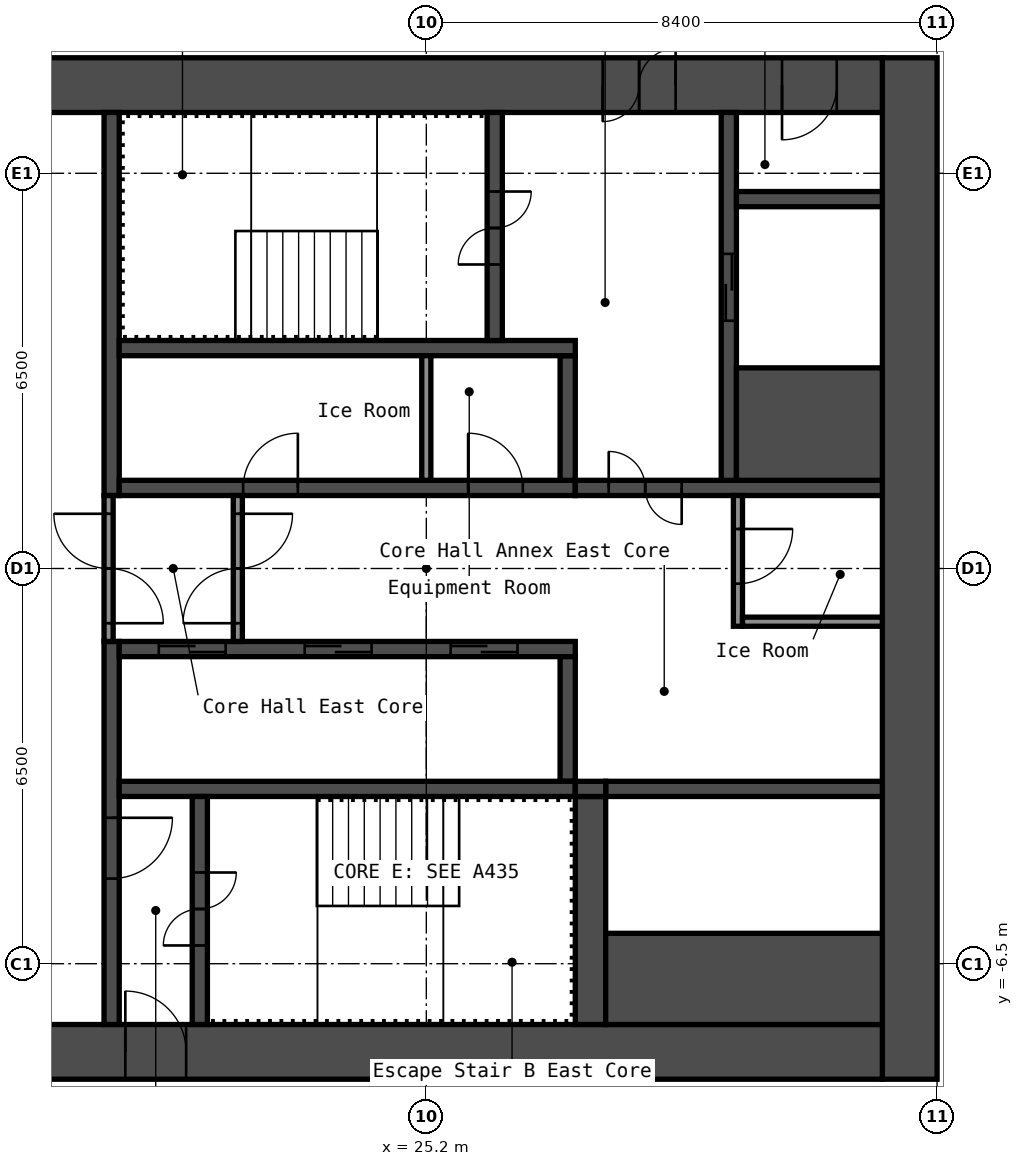
"""IFC4 building model, lengths in metres.
Left out: names, types, materials, properties, quantities, classifications, styles, units other than length and angle.
Written with IfcOpenShell. Run it as: python <this file> out.ifc"""

import sys

from ifc_helpers import new_model, si_unit, direction, frame, frame_2d, origin, place, context, subcontext, project, spatial, rectangle, extrude, element, fill, save


model = new_model("IFC4")
c1 = context("Model", 3, precision=1e-05, world=origin(), true_north=direction((0.0, 1.0)))
c2 = subcontext(c1, "Body", "Model", "MODEL_VIEW")
j1 = project(units=[si_unit("LENGTHUNIT", "METRE"), si_unit("PLANEANGLEUNIT", "RADIAN")], contexts=[c1])
p1 = place(None, origin())
s1 = spatial("IfcSite", under=j1, at=p1, CompositionType="ELEMENT")
p2 = place(p1, origin())
s2 = spatial("IfcBuilding", under=s1, at=p2, CompositionType="ELEMENT")
p3 = place(p2, frame((0.0, 0.0, 242.2)))
s3 = spatial("IfcBuildingStorey", under=s2, at=p3, CompositionType="ELEMENT", Elevation=242.2)
p4 = place(p3, frame((33.15, -8.4, 0.0), z_axis=(0.0, 0.0, 1.0), x_axis=(0.0, 1.0, 0.0)))
e1 = element("IfcWall", 1, at=p4, inside=s3, PredefinedType="SHEAR", context=c2, shape_type="SweptSolid", body=[
    extrude(rectangle(XDim=16.8, YDim=0.9, at=frame_2d((8.4, 0.0))), origin(), (0.0, 0.0, 1.0), 2.75),
])
p5 = place(p3, frame((17.7, 7.95, 0.0), z_axis=(0.0, 0.0, 1.0), x_axis=(1.0, 0.0, 0.0)))
e2 = element("IfcWall", 2, at=p5, inside=s3, PredefinedType="SHEAR", context=c2, shape_type="SweptSolid", body=[
    extrude(rectangle(XDim=15.0, YDim=0.9, at=frame_2d((7.5, 0.0))), origin(), (0.0, 0.0, 1.0), 2.75),
])
p6 = place(p5, frame((10.4, 0.0, 0.0)))
e3 = element("IfcOpeningElement", 3, at=p6, cuts=e2, PredefinedType="OPENING", context=c2, shape_type="SweptSolid", body=[
    extrude(rectangle(XDim=1.2, YDim=2.1, at=frame_2d((0.6, 1.05))), frame((0.0, 0.46, 0.0), z_axis=(0.0, -1.0, 0.0), x_axis=(1.0, 0.0, 0.0)), (0.0, 0.0, 1.0), 0.92),
])
p7 = place(p5, frame((13.35, 0.0, 0.0)))
e4 = element("IfcOpeningElement", 4, at=p7, cuts=e2, PredefinedType="OPENING", context=c2, shape_type="SweptSolid", body=[
    extrude(rectangle(XDim=0.9, YDim=2.1, at=frame_2d((0.45, 1.05))), frame((0.0, 0.46, 0.0), z_axis=(0.0, -1.0, 0.0), x_axis=(1.0, 0.0, 0.0)), (0.0, 0.0, 1.0), 0.92),
])
p8 = place(p3, frame((17.7, -7.95, 0.0), z_axis=(0.0, 0.0, 1.0), x_axis=(1.0, 0.0, 0.0)))
e5 = element("IfcWall", 5, at=p8, inside=s3, PredefinedType="SHEAR", context=c2, shape_type="SweptSolid", body=[
    extrude(rectangle(XDim=15.0, YDim=0.9, at=frame_2d((7.5, 0.0))), origin(), (0.0, 0.0, 1.0), 2.75),
])
p9 = place(p8, frame((2.55, 0.0, 0.0)))
e6 = element("IfcOpeningElement", 6, at=p9, cuts=e5, PredefinedType="OPENING", context=c2, shape_type="SweptSolid", body=[
    extrude(rectangle(XDim=1.0, YDim=2.1, at=frame_2d((0.5, 1.05))), frame((0.0, 0.46, 0.0), z_axis=(0.0, -1.0, 0.0), x_axis=(1.0, 0.0, 0.0)), (0.0, 0.0, 1.0), 0.92),
])
p10 = place(p3, frame((20.025, 1.2, 0.0), z_axis=(0.0, 0.0, 1.0), x_axis=(0.0, 1.0, 0.0)))
e7 = element("IfcWall", 7, at=p10, inside=s3, PredefinedType="SHEAR", context=c2, shape_type="SweptSolid", body=[
    extrude(rectangle(XDim=6.3, YDim=0.25, at=frame_2d((3.15, 0.0))), origin(), (0.0, 0.0, 1.0), 2.75),
])
p11 = place(p3, frame((20.025, -7.5, 0.0), z_axis=(0.0, 0.0, 1.0), x_axis=(0.0, 1.0, 0.0)))
e8 = element("IfcWall", 8, at=p11, inside=s3, PredefinedType="SHEAR", context=c2, shape_type="SweptSolid", body=[
    extrude(rectangle(XDim=6.3, YDim=0.25, at=frame_2d((3.15, 0.0))), origin(), (0.0, 0.0, 1.0), 2.75),
])
p12 = place(p11, frame((2.4, 0.0, 0.0)))
e9 = element("IfcOpeningElement", 9, at=p12, cuts=e8, PredefinedType="OPENING", context=c2, shape_type="SweptSolid", body=[
    extrude(rectangle(XDim=1.0, YDim=2.1, at=frame_2d((0.5, 1.05))), frame((0.0, 0.135, 0.0), z_axis=(0.0, -1.0, 0.0), x_axis=(1.0, 0.0, 0.0)), (0.0, 0.0, 1.0), 0.27),
])
p13 = place(p3, frame((20.15, 1.325, 0.0), z_axis=(0.0, 0.0, 1.0), x_axis=(1.0, 0.0, 0.0)))
e10 = element("IfcWall", 10, at=p13, inside=s3, PredefinedType="SHEAR", context=c2, shape_type="SweptSolid", body=[
    extrude(rectangle(XDim=7.5, YDim=0.25, at=frame_2d((3.75, 0.0))), origin(), (0.0, 0.0, 1.0), 2.75),
])
p14 = place(p13, frame((2.038, 0.0, 0.0)))
e11 = element("IfcOpeningElement", 11, at=p14, cuts=e10, PredefinedType="OPENING", context=c2, shape_type="SweptSolid", body=[
    extrude(rectangle(XDim=0.9, YDim=2.1, at=frame_2d((0.45, 1.05))), frame((0.0, 0.135, 0.0), z_axis=(0.0, -1.0, 0.0), x_axis=(1.0, 0.0, 0.0)), (0.0, 0.0, 1.0), 0.27),
])
p15 = place(p13, frame((5.738, 0.0, 0.0)))
e12 = element("IfcOpeningElement", 12, at=p15, cuts=e10, PredefinedType="OPENING", context=c2, shape_type="SweptSolid", body=[
    extrude(rectangle(XDim=0.9, YDim=2.1, at=frame_2d((0.45, 1.05))), frame((0.0, 0.135, 0.0), z_axis=(0.0, -1.0, 0.0), x_axis=(1.0, 0.0, 0.0)), (0.0, 0.0, 1.0), 0.27),
])
p16 = place(p3, frame((27.525, 1.45, 0.0), z_axis=(0.0, 0.0, 1.0), x_axis=(0.0, 1.0, 0.0)))
e13 = element("IfcWall", 13, at=p16, inside=s3, PredefinedType="SHEAR", context=c2, shape_type="SweptSolid", body=[
    extrude(rectangle(XDim=2.05, YDim=0.25, at=frame_2d((1.025, 0.0))), origin(), (0.0, 0.0, 1.0), 2.75),
])
p17 = place(p3, frame((20.15, 3.625, 0.0), z_axis=(0.0, 0.0, 1.0), x_axis=(1.0, 0.0, 0.0)))
e14 = element("IfcWall", 14, at=p17, inside=s3, PredefinedType="SHEAR", context=c2, shape_type="SweptSolid", body=[
    extrude(rectangle(XDim=7.5, YDim=0.25, at=frame_2d((3.75, 0.0))), origin(), (0.0, 0.0, 1.0), 2.75),
])
p18 = place(p3, frame((26.325, 3.75, 0.0), z_axis=(0.0, 0.0, 1.0), x_axis=(0.0, 1.0, 0.0)))
e15 = element("IfcWall", 15, at=p18, inside=s3, PredefinedType="SHEAR", context=c2, shape_type="SweptSolid", body=[
    extrude(rectangle(XDim=3.75, YDim=0.25, at=frame_2d((1.875, 0.0))), origin(), (0.0, 0.0, 1.0), 2.75),
])
p19 = place(p18, frame((1.25, 0.0, 0.0)))
e16 = element("IfcOpeningElement", 16, at=p19, cuts=e15, PredefinedType="OPENING", context=c2, shape_type="SweptSolid", body=[
    extrude(rectangle(XDim=1.2, YDim=2.1, at=frame_2d((0.6, 1.05))), frame((0.0, 0.135, 0.0), z_axis=(0.0, -1.0, 0.0), x_axis=(1.0, 0.0, 0.0)), (0.0, 0.0, 1.0), 0.27),
])
p20 = place(p3, frame((27.65, 1.325, 0.0), z_axis=(0.0, 0.0, 1.0), x_axis=(1.0, 0.0, 0.0)))
e17 = element("IfcWall", 17, at=p20, inside=s3, PredefinedType="SHEAR", context=c2, shape_type="SweptSolid", body=[
    extrude(rectangle(XDim=5.05, YDim=0.25, at=frame_2d((2.525, 0.0))), origin(), (0.0, 0.0, 1.0), 2.75),
])
p21 = place(p20, frame((0.55, 0.0, 0.0)))
e18 = element("IfcOpeningElement", 18, at=p21, cuts=e17, PredefinedType="OPENING", context=c2, shape_type="SweptSolid", body=[
    extrude(rectangle(XDim=1.2, YDim=2.1, at=frame_2d((0.6, 1.05))), frame((0.0, 0.135, 0.0), z_axis=(0.0, -1.0, 0.0), x_axis=(1.0, 0.0, 0.0)), (0.0, 0.0, 1.0), 0.27),
])
p22 = place(p3, frame((30.175, 1.45, 0.0), z_axis=(0.0, 0.0, 1.0), x_axis=(0.0, 1.0, 0.0)))
e19 = element("IfcWall", 19, at=p22, inside=s3, PredefinedType="SHEAR", context=c2, shape_type="SweptSolid", body=[
    extrude(rectangle(XDim=6.05, YDim=0.25, at=frame_2d((3.025, 0.0))), origin(), (0.0, 0.0, 1.0), 2.75),
])
p23 = place(p22, frame((2.625, 0.0, 0.0)))
e20 = element("IfcOpeningElement", 20, at=p23, cuts=e19, PredefinedType="OPENING", context=c2, shape_type="SweptSolid", body=[
    extrude(rectangle(XDim=1.1, YDim=2.1, at=frame_2d((0.55, 1.05))), frame((0.0, 0.135, 0.0), z_axis=(0.0, -1.0, 0.0), x_axis=(1.0, 0.0, 0.0)), (0.0, 0.0, 1.0), 0.27),
])
p24 = place(p3, frame((30.3, 2.375, 0.0), z_axis=(0.0, 0.0, 1.0), x_axis=(1.0, 0.0, 0.0)))
e21 = element("IfcWall", 21, at=p24, inside=s3, PredefinedType="SHEAR", context=c2, shape_type="SweptSolid", body=[
    extrude(rectangle(XDim=2.4, YDim=1.85, at=frame_2d((1.2, 0.0))), origin(), (0.0, 0.0, 1.0), 2.75),
])
p25 = place(p3, frame((30.3, 6.075, 0.0), z_axis=(0.0, 0.0, 1.0), x_axis=(1.0, 0.0, 0.0)))
e22 = element("IfcWall", 22, at=p25, inside=s3, PredefinedType="SHEAR", context=c2, shape_type="SweptSolid", body=[
    extrude(rectangle(XDim=2.4, YDim=0.25, at=frame_2d((1.2, 0.0))), origin(), (0.0, 0.0, 1.0), 2.75),
])
p26 = place(p3, frame((20.15, -1.325, 0.0), z_axis=(0.0, 0.0, 1.0), x_axis=(1.0, 0.0, 0.0)))
e23 = element("IfcWall", 23, at=p26, inside=s3, PredefinedType="SHEAR", context=c2, shape_type="SweptSolid", body=[
    extrude(rectangle(XDim=7.5, YDim=0.25, at=frame_2d((3.75, 0.0))), origin(), (0.0, 0.0, 1.0), 2.75),
])
p27 = place(p26, frame((0.65, 0.0, 0.0)))
e24 = element("IfcOpeningElement", 24, at=p27, cuts=e23, PredefinedType="OPENING", context=c2, shape_type="SweptSolid", body=[
    extrude(rectangle(XDim=1.1, YDim=2.1, at=frame_2d((0.55, 1.05))), frame((0.0, 0.135, 0.0), z_axis=(0.0, -1.0, 0.0), x_axis=(1.0, 0.0, 0.0)), (0.0, 0.0, 1.0), 0.27),
])
p28 = place(p26, frame((3.05, 0.0, 0.0)))
e25 = element("IfcOpeningElement", 25, at=p28, cuts=e23, PredefinedType="OPENING", context=c2, shape_type="SweptSolid", body=[
    extrude(rectangle(XDim=1.1, YDim=2.1, at=frame_2d((0.55, 1.05))), frame((0.0, 0.135, 0.0), z_axis=(0.0, -1.0, 0.0), x_axis=(1.0, 0.0, 0.0)), (0.0, 0.0, 1.0), 0.27),
])
p29 = place(p26, frame((5.45, 0.0, 0.0)))
e26 = element("IfcOpeningElement", 26, at=p29, cuts=e23, PredefinedType="OPENING", context=c2, shape_type="SweptSolid", body=[
    extrude(rectangle(XDim=1.1, YDim=2.1, at=frame_2d((0.55, 1.05))), frame((0.0, 0.135, 0.0), z_axis=(0.0, -1.0, 0.0), x_axis=(1.0, 0.0, 0.0)), (0.0, 0.0, 1.0), 0.27),
])
p30 = place(p3, frame((27.525, -3.5, 0.0), z_axis=(0.0, 0.0, 1.0), x_axis=(0.0, 1.0, 0.0)))
e27 = element("IfcWall", 27, at=p30, inside=s3, PredefinedType="SHEAR", context=c2, shape_type="SweptSolid", body=[
    extrude(rectangle(XDim=2.05, YDim=0.25, at=frame_2d((1.025, 0.0))), origin(), (0.0, 0.0, 1.0), 2.75),
])
p31 = place(p3, frame((20.15, -3.625, 0.0), z_axis=(0.0, 0.0, 1.0), x_axis=(1.0, 0.0, 0.0)))
e28 = element("IfcWall", 28, at=p31, inside=s3, PredefinedType="SHEAR", context=c2, shape_type="SweptSolid", body=[
    extrude(rectangle(XDim=7.5, YDim=0.25, at=frame_2d((3.75, 0.0))), origin(), (0.0, 0.0, 1.0), 2.75),
])
p32 = place(p3, frame((21.475, -7.5, 0.0), z_axis=(0.0, 0.0, 1.0), x_axis=(0.0, 1.0, 0.0)))
e29 = element("IfcWall", 29, at=p32, inside=s3, PredefinedType="SHEAR", context=c2, shape_type="SweptSolid", body=[
    extrude(rectangle(XDim=3.75, YDim=0.25, at=frame_2d((1.875, 0.0))), origin(), (0.0, 0.0, 1.0), 2.75),
])
p33 = place(p32, frame((1.3, 0.0, 0.0)))
e30 = element("IfcOpeningElement", 30, at=p33, cuts=e29, PredefinedType="OPENING", context=c2, shape_type="SweptSolid", body=[
    extrude(rectangle(XDim=1.2, YDim=2.1, at=frame_2d((0.6, 1.05))), frame((0.0, 0.135, 0.0), z_axis=(0.0, -1.0, 0.0), x_axis=(1.0, 0.0, 0.0)), (0.0, 0.0, 1.0), 0.27),
])
p34 = place(p3, frame((27.9, -7.5, 0.0), z_axis=(0.0, 0.0, 1.0), x_axis=(0.0, 1.0, 0.0)))
e31 = element("IfcWall", 31, at=p34, inside=s3, PredefinedType="SHEAR", context=c2, shape_type="SweptSolid", body=[
    extrude(rectangle(XDim=3.75, YDim=0.5, at=frame_2d((1.875, 0.0))), origin(), (0.0, 0.0, 1.0), 2.75),
])
p35 = place(p3, frame((28.15, -3.625, 0.0), z_axis=(0.0, 0.0, 1.0), x_axis=(1.0, 0.0, 0.0)))
e32 = element("IfcWall", 32, at=p35, inside=s3, PredefinedType="SHEAR", context=c2, shape_type="SweptSolid", body=[
    extrude(rectangle(XDim=4.55, YDim=0.25, at=frame_2d((2.275, 0.0))), origin(), (0.0, 0.0, 1.0), 2.75),
])
p36 = place(p3, frame((28.15, -6.75, 0.0), z_axis=(0.0, 0.0, 1.0), x_axis=(1.0, 0.0, 0.0)))
e33 = element("IfcWall", 33, at=p36, inside=s3, PredefinedType="SHEAR", context=c2, shape_type="SweptSolid", body=[
    extrude(rectangle(XDim=4.55, YDim=1.5, at=frame_2d((2.275, 0.0))), origin(), (0.0, 0.0, 1.0), 2.75),
])
p37 = place(p3, frame((27.65, -3.625, 0.0), z_axis=(0.0, 0.0, 1.0), x_axis=(1.0, 0.0, 0.0)))
e34 = element("IfcWall", 34, at=p37, inside=s3, PredefinedType="SHEAR", context=c2, shape_type="SweptSolid", body=[
    extrude(rectangle(XDim=0.5, YDim=0.25, at=frame_2d((0.25, 0.0))), origin(), (0.0, 0.0, 1.0), 2.75),
])
p38 = place(p3, frame((19.975, -1.2, 0.0), z_axis=(0.0, 0.0, 1.0), x_axis=(0.0, 1.0, 0.0)))
e35 = element("IfcWall", 35, at=p38, inside=s3, PredefinedType="PARTITIONING", context=c2, shape_type="SweptSolid", body=[
    extrude(rectangle(XDim=2.4, YDim=0.15, at=frame_2d((1.2, 0.0))), origin(), (0.0, 0.0, 1.0), 2.75),
])
p39 = place(p38, frame((0.3, 0.0, 0.0)))
e36 = element("IfcOpeningElement", 36, at=p39, cuts=e35, PredefinedType="OPENING", context=c2, shape_type="SweptSolid", body=[
    extrude(rectangle(XDim=1.8, YDim=2.1, at=frame_2d((0.9, 1.05))), frame((0.0, 0.085, 0.0), z_axis=(0.0, -1.0, 0.0), x_axis=(1.0, 0.0, 0.0)), (0.0, 0.0, 1.0), 0.17),
])
p40 = place(p3, frame((22.1, -1.2, 0.0), z_axis=(0.0, 0.0, 1.0), x_axis=(0.0, 1.0, 0.0)))
e37 = element("IfcWall", 37, at=p40, inside=s3, PredefinedType="PARTITIONING", context=c2, shape_type="SweptSolid", body=[
    extrude(rectangle(XDim=2.4, YDim=0.15, at=frame_2d((1.2, 0.0))), origin(), (0.0, 0.0, 1.0), 2.75),
])
p41 = place(p40, frame((0.3, 0.0, 0.0)))
e38 = element("IfcOpeningElement", 38, at=p41, cuts=e37, PredefinedType="OPENING", context=c2, shape_type="SweptSolid", body=[
    extrude(rectangle(XDim=1.8, YDim=2.1, at=frame_2d((0.9, 1.05))), frame((0.0, 0.085, 0.0), z_axis=(0.0, -1.0, 0.0), x_axis=(1.0, 0.0, 0.0)), (0.0, 0.0, 1.0), 0.17),
])
p42 = place(p3, frame((30.325, -0.95, 0.0), z_axis=(0.0, 0.0, 1.0), x_axis=(0.0, 1.0, 0.0)))
e39 = element("IfcWall", 39, at=p42, inside=s3, PredefinedType="PARTITIONING", context=c2, shape_type="SweptSolid", body=[
    extrude(rectangle(XDim=2.15, YDim=0.15, at=frame_2d((1.075, 0.0))), origin(), (0.0, 0.0, 1.0), 2.75),
])
p43 = place(p42, frame((0.7, 0.0, 0.0)))
e40 = element("IfcOpeningElement", 40, at=p43, cuts=e39, PredefinedType="OPENING", context=c2, shape_type="SweptSolid", body=[
    extrude(rectangle(XDim=0.9, YDim=2.1, at=frame_2d((0.45, 1.05))), frame((0.0, 0.085, 0.0), z_axis=(0.0, -1.0, 0.0), x_axis=(1.0, 0.0, 0.0)), (0.0, 0.0, 1.0), 0.17),
])
p44 = place(p3, frame((30.4, -0.875, 0.0), z_axis=(0.0, 0.0, 1.0), x_axis=(1.0, 0.0, 0.0)))
e41 = element("IfcWall", 41, at=p44, inside=s3, PredefinedType="PARTITIONING", context=c2, shape_type="SweptSolid", body=[
    extrude(rectangle(XDim=2.3, YDim=0.15, at=frame_2d((1.15, 0.0))), origin(), (0.0, 0.0, 1.0), 2.75),
])
p45 = place(p3, frame((25.2, 1.45, 0.0), z_axis=(0.0, 0.0, 1.0), x_axis=(0.0, 1.0, 0.0)))
e42 = element("IfcWall", 42, at=p45, inside=s3, PredefinedType="PARTITIONING", context=c2, shape_type="SweptSolid", body=[
    extrude(rectangle(XDim=2.05, YDim=0.15, at=frame_2d((1.025, 0.0))), origin(), (0.0, 0.0, 1.0), 2.75),
])
p46 = place(p6, origin())
e43 = element("IfcDoor", 43, at=p46, inside=s3, OperationType="DOUBLE_DOOR_SINGLE_SWING", PredefinedType="DOOR", context=c2, shape_type="SweptSolid", body=[
    extrude(rectangle(XDim=1.2, YDim=2.1, at=frame_2d((0.6, 1.05))), frame((0.0, 0.025, 0.0), z_axis=(0.0, -1.0, 0.0), x_axis=(1.0, 0.0, 0.0)), (0.0, 0.0, 1.0), 0.05),
])
fill(e3, e43)
p47 = place(p7, origin())
e44 = element("IfcDoor", 44, at=p47, inside=s3, OperationType="SINGLE_SWING_LEFT", PredefinedType="DOOR", context=c2, shape_type="SweptSolid", body=[
    extrude(rectangle(XDim=0.9, YDim=2.1, at=frame_2d((0.45, 1.05))), frame((0.0, 0.025, 0.0), z_axis=(0.0, -1.0, 0.0), x_axis=(1.0, 0.0, 0.0)), (0.0, 0.0, 1.0), 0.05),
])
fill(e4, e44)
p48 = place(p9, origin())
e45 = element("IfcDoor", 45, at=p48, inside=s3, OperationType="SINGLE_SWING_RIGHT", PredefinedType="DOOR", context=c2, shape_type="SweptSolid", body=[
    extrude(rectangle(XDim=1.0, YDim=2.1, at=frame_2d((0.5, 1.05))), frame((0.0, 0.025, 0.0), z_axis=(0.0, -1.0, 0.0), x_axis=(1.0, 0.0, 0.0)), (0.0, 0.0, 1.0), 0.05),
])
fill(e6, e45)
p49 = place(p19, origin())
e46 = element("IfcDoor", 46, at=p49, inside=s3, OperationType="DOUBLE_DOOR_SINGLE_SWING", PredefinedType="DOOR", context=c2, shape_type="SweptSolid", body=[
    extrude(rectangle(XDim=1.2, YDim=2.1, at=frame_2d((0.6, 1.05))), frame((0.0, 0.025, 0.0), z_axis=(0.0, -1.0, 0.0), x_axis=(1.0, 0.0, 0.0)), (0.0, 0.0, 1.0), 0.05),
])
fill(e16, e46)
p50 = place(p33, origin())
e47 = element("IfcDoor", 47, at=p50, inside=s3, OperationType="DOUBLE_DOOR_SINGLE_SWING", PredefinedType="DOOR", context=c2, shape_type="SweptSolid", body=[
    extrude(rectangle(XDim=1.2, YDim=2.1, at=frame_2d((0.6, 1.05))), frame((0.0, 0.025, 0.0), z_axis=(0.0, -1.0, 0.0), x_axis=(1.0, 0.0, 0.0)), (0.0, 0.0, 1.0), 0.05),
])
fill(e30, e47)
p51 = place(p12, origin())
e48 = element("IfcDoor", 48, at=p51, inside=s3, OperationType="SINGLE_SWING_RIGHT", PredefinedType="DOOR", context=c2, shape_type="SweptSolid", body=[
    extrude(rectangle(XDim=1.0, YDim=2.1, at=frame_2d((0.5, 1.05))), frame((0.0, 0.025, 0.0), z_axis=(0.0, -1.0, 0.0), x_axis=(1.0, 0.0, 0.0)), (0.0, 0.0, 1.0), 0.05),
])
fill(e9, e48)
p52 = place(p21, origin())
e49 = element("IfcDoor", 49, at=p52, inside=s3, OperationType="DOUBLE_DOOR_SINGLE_SWING", PredefinedType="DOOR", context=c2, shape_type="SweptSolid", body=[
    extrude(rectangle(XDim=1.2, YDim=2.1, at=frame_2d((0.6, 1.05))), frame((0.0, 0.025, 0.0), z_axis=(0.0, -1.0, 0.0), x_axis=(1.0, 0.0, 0.0)), (0.0, 0.0, 1.0), 0.05),
])
fill(e18, e49)
p53 = place(p39, origin())
e50 = element("IfcDoor", 50, at=p53, inside=s3, OperationType="DOUBLE_DOOR_SINGLE_SWING", PredefinedType="DOOR", context=c2, shape_type="SweptSolid", body=[
    extrude(rectangle(XDim=1.8, YDim=2.1, at=frame_2d((0.9, 1.05))), frame((0.0, 0.025, 0.0), z_axis=(0.0, -1.0, 0.0), x_axis=(1.0, 0.0, 0.0)), (0.0, 0.0, 1.0), 0.05),
])
fill(e36, e50)
p54 = place(p41, origin())
e51 = element("IfcDoor", 51, at=p54, inside=s3, OperationType="DOUBLE_DOOR_SINGLE_SWING", PredefinedType="DOOR", context=c2, shape_type="SweptSolid", body=[
    extrude(rectangle(XDim=1.8, YDim=2.1, at=frame_2d((0.9, 1.05))), frame((0.0, 0.025, 0.0), z_axis=(0.0, -1.0, 0.0), x_axis=(1.0, 0.0, 0.0)), (0.0, 0.0, 1.0), 0.05),
])
fill(e38, e51)
p55 = place(p43, origin())
e52 = element("IfcDoor", 52, at=p55, inside=s3, OperationType="SINGLE_SWING_RIGHT", PredefinedType="DOOR", context=c2, shape_type="SweptSolid", body=[
    extrude(rectangle(XDim=0.9, YDim=2.1, at=frame_2d((0.45, 1.05))), frame((0.0, 0.025, 0.0), z_axis=(0.0, -1.0, 0.0), x_axis=(1.0, 0.0, 0.0)), (0.0, 0.0, 1.0), 0.05),
])
fill(e40, e52)
p56 = place(p14, origin())
e53 = element("IfcDoor", 53, at=p56, inside=s3, OperationType="SINGLE_SWING_LEFT", PredefinedType="DOOR", context=c2, shape_type="SweptSolid", body=[
    extrude(rectangle(XDim=0.9, YDim=2.1, at=frame_2d((0.45, 1.05))), frame((0.0, 0.025, 0.0), z_axis=(0.0, -1.0, 0.0), x_axis=(1.0, 0.0, 0.0)), (0.0, 0.0, 1.0), 0.05),
])
fill(e11, e53)
p57 = place(p15, origin())
e54 = element("IfcDoor", 54, at=p57, inside=s3, OperationType="SINGLE_SWING_RIGHT", PredefinedType="DOOR", context=c2, shape_type="SweptSolid", body=[
    extrude(rectangle(XDim=0.9, YDim=2.1, at=frame_2d((0.45, 1.05))), frame((0.0, 0.025, 0.0), z_axis=(0.0, -1.0, 0.0), x_axis=(1.0, 0.0, 0.0)), (0.0, 0.0, 1.0), 0.05),
])
fill(e12, e54)
p58 = place(p27, origin())
e55 = element("IfcDoor", 55, at=p58, inside=s3, OperationType="DOUBLE_DOOR_SLIDING", PredefinedType="DOOR", context=c2, shape_type="SweptSolid", body=[
    extrude(rectangle(XDim=1.1, YDim=2.1, at=frame_2d((0.55, 1.05))), frame((0.0, 0.025, 0.0), z_axis=(0.0, -1.0, 0.0), x_axis=(1.0, 0.0, 0.0)), (0.0, 0.0, 1.0), 0.05),
])
fill(e24, e55)
p59 = place(p28, origin())
e56 = element("IfcDoor", 56, at=p59, inside=s3, OperationType="DOUBLE_DOOR_SLIDING", PredefinedType="DOOR", context=c2, shape_type="SweptSolid", body=[
    extrude(rectangle(XDim=1.1, YDim=2.1, at=frame_2d((0.55, 1.05))), frame((0.0, 0.025, 0.0), z_axis=(0.0, -1.0, 0.0), x_axis=(1.0, 0.0, 0.0)), (0.0, 0.0, 1.0), 0.05),
])
fill(e25, e56)
p60 = place(p29, origin())
e57 = element("IfcDoor", 57, at=p60, inside=s3, OperationType="DOUBLE_DOOR_SLIDING", PredefinedType="DOOR", context=c2, shape_type="SweptSolid", body=[
    extrude(rectangle(XDim=1.1, YDim=2.1, at=frame_2d((0.55, 1.05))), frame((0.0, 0.025, 0.0), z_axis=(0.0, -1.0, 0.0), x_axis=(1.0, 0.0, 0.0)), (0.0, 0.0, 1.0), 0.05),
])
fill(e26, e57)
p61 = place(p23, origin())
e58 = element("IfcDoor", 58, at=p61, inside=s3, OperationType="DOUBLE_DOOR_SLIDING", PredefinedType="DOOR", context=c2, shape_type="SweptSolid", body=[
    extrude(rectangle(XDim=1.1, YDim=2.1, at=frame_2d((0.55, 1.05))), frame((0.0, 0.025, 0.0), z_axis=(0.0, -1.0, 0.0), x_axis=(1.0, 0.0, 0.0)), (0.0, 0.0, 1.0), 0.05),
])
fill(e20, e58)
save(model, sys.argv[1])
